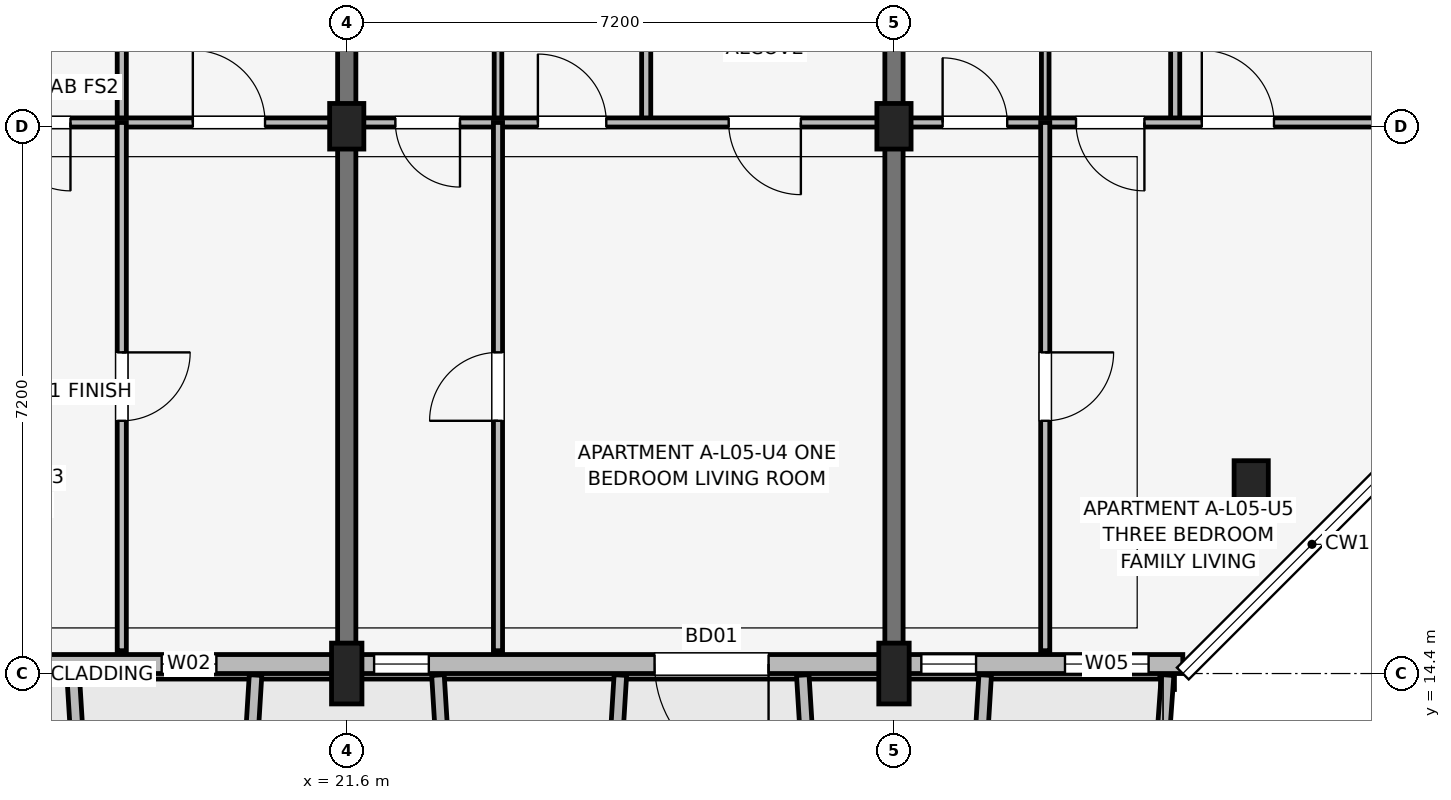
"""IFC4 building model, lengths in metres.
Left out: names, types, materials, properties, quantities, classifications, styles, units other than length and angle.
Written with IfcOpenShell. Run it as: python <this file> out.ifc"""

import sys

from ifc_helpers import new_model, si_unit, direction, frame, frame_2d, origin, origin_2d, place, context, subcontext, project, spatial, rectangle, extrude, element, fill, save


model = new_model("IFC4")
c1 = context("Model", 3, precision=1e-05, world=origin(), true_north=direction((0.0, 1.0)))
c2 = subcontext(c1, "Body", "Model", "MODEL_VIEW")
j1 = project(units=[si_unit("LENGTHUNIT", "METRE"), si_unit("PLANEANGLEUNIT", "RADIAN")], contexts=[c1])
p1 = place(None, origin())
s1 = spatial("IfcSite", under=j1, at=p1, CompositionType="ELEMENT")
p2 = place(p1, origin())
s2 = spatial("IfcBuilding", under=s1, at=p2, CompositionType="ELEMENT")
p3 = place(p2, frame((0.0, 0.0, 18.15)))
s3 = spatial("IfcBuildingStorey", under=s2, at=p3, CompositionType="ELEMENT", Elevation=18.15)
p4 = place(p3, frame((21.6, 14.4, 0.0), z_axis=(0.0, 0.0, 1.0), x_axis=(1.0, 0.0, 0.0)))
e1 = element("IfcColumn", 1, at=p4, inside=s3, PredefinedType="COLUMN", context=c2, shape_type="SweptSolid", body=[
    extrude(rectangle(XDim=0.4, YDim=0.8, at=origin_2d()), origin(), (0.0, 0.0, 1.0), 3.15),
])
p5 = place(p3, frame((21.6, 21.6, 0.0), z_axis=(0.0, 0.0, 1.0), x_axis=(1.0, 0.0, 0.0)))
e2 = element("IfcColumn", 2, at=p5, inside=s3, PredefinedType="COLUMN", context=c2, shape_type="SweptSolid", body=[
    extrude(rectangle(XDim=0.45, YDim=0.6, at=origin_2d()), origin(), (0.0, 0.0, 1.0), 3.15),
])
p6 = place(p3, frame((28.8, 14.4, 0.0), z_axis=(0.0, 0.0, 1.0), x_axis=(1.0, 0.0, 0.0)))
e3 = element("IfcColumn", 3, at=p6, inside=s3, PredefinedType="COLUMN", context=c2, shape_type="SweptSolid", body=[
    extrude(rectangle(XDim=0.4, YDim=0.8, at=origin_2d()), origin(), (0.0, 0.0, 1.0), 3.15),
])
for number, where, z_axis, x_axis in (
    (4, (28.8, 21.6, 0.0), (0.0, 0.0, 1.0), (1.0, 0.0, 0.0)),
    (5, (33.5, 16.9, 0.0), (0.0, 0.0, 1.0), (1.0, 0.0, 0.0)),
):
    element("IfcColumn", number, at=place(p3, frame(where, z_axis=z_axis, x_axis=x_axis)), inside=s3, PredefinedType="COLUMN", context=c2, shape_type="SweptSolid", body=[
        extrude(rectangle(XDim=0.45, YDim=0.6, at=origin_2d()), origin(), (0.0, 0.0, 1.0), 3.15),
    ])
for number, where, z_axis, x_axis in (
    (6, (21.6, 14.75, 0.0), (0.0, 0.0, 1.0), (0.0, 1.0, 0.0)),
    (7, (28.8, 14.75, 0.0), (0.0, 0.0, 1.0), (0.0, 1.0, 0.0)),
):
    element("IfcWall", number, at=place(p3, frame(where, z_axis=z_axis, x_axis=x_axis)), inside=s3, PredefinedType="SHEAR", context=c2, shape_type="SweptSolid", body=[
        extrude(rectangle(XDim=9.4, YDim=0.24, at=frame_2d((4.7, 0.0))), origin(), (0.0, 0.0, 1.0), 3.15),
    ])
p7 = place(p3, frame((3.4, 14.525, 0.0), z_axis=(0.0, 0.0, 1.0), x_axis=(1.0, 0.0, 0.0)))
e8 = element("IfcWall", 8, at=p7, inside=s3, PredefinedType="SOLIDWALL", context=c2, shape_type="SweptSolid", body=[
    extrude(rectangle(XDim=29.2, YDim=0.25, at=frame_2d((14.6, 0.0))), origin(), (0.0, 0.0, 1.0), 2.43),
])
p8 = place(p7, frame((9.425, 0.0, 0.0), z_axis=(0.0, 0.0, 1.0), x_axis=(-1.0, 0.0, 0.0)))
e9 = element("IfcOpeningElement", 9, at=p8, cuts=e8, PredefinedType="OPENING", context=c2, shape_type="SweptSolid", body=[
    extrude(rectangle(XDim=1.65, YDim=2.15, at=frame_2d((0.825, 1.075))), frame((0.0, 0.135, 0.0), z_axis=(0.0, -1.0, 0.0), x_axis=(1.0, 0.0, 0.0)), (0.0, 0.0, 1.0), 0.27),
])
p9 = place(p7, frame((23.75, 0.0, 0.0), z_axis=(0.0, 0.0, 1.0), x_axis=(-1.0, 0.0, 0.0)))
e10 = element("IfcOpeningElement", 10, at=p9, cuts=e8, PredefinedType="OPENING", context=c2, shape_type="SweptSolid", body=[
    extrude(rectangle(XDim=1.5, YDim=2.15, at=frame_2d((0.75, 1.075))), frame((0.0, 0.135, 0.0), z_axis=(0.0, -1.0, 0.0), x_axis=(1.0, 0.0, 0.0)), (0.0, 0.0, 1.0), 0.27),
])
p10 = place(p7, frame((0.61, 0.0, 0.7)))
e11 = element("IfcOpeningElement", 11, at=p10, cuts=e8, PredefinedType="OPENING", context=c2, shape_type="SweptSolid", body=[
    extrude(rectangle(XDim=1.58, YDim=1.6, at=frame_2d((0.79, 0.8))), frame((0.0, 0.135, 0.0), z_axis=(0.0, -1.0, 0.0), x_axis=(1.0, 0.0, 0.0)), (0.0, 0.0, 1.0), 0.27),
])
p11 = place(p7, frame((12.54, 0.0, 0.7)))
e12 = element("IfcOpeningElement", 12, at=p11, cuts=e8, PredefinedType="OPENING", context=c2, shape_type="SweptSolid", body=[
    extrude(rectangle(XDim=1.72, YDim=1.6, at=frame_2d((0.86, 0.8))), frame((0.0, 0.135, 0.0), z_axis=(0.0, -1.0, 0.0), x_axis=(1.0, 0.0, 0.0)), (0.0, 0.0, 1.0), 0.27),
])
p12 = place(p7, frame((15.765, 0.0, 0.75)))
e13 = element("IfcOpeningElement", 13, at=p12, cuts=e8, PredefinedType="OPENING", context=c2, shape_type="SweptSolid", body=[
    extrude(rectangle(XDim=0.72, YDim=1.35, at=frame_2d((0.36, 0.675))), frame((0.0, 0.135, 0.0), z_axis=(0.0, -1.0, 0.0), x_axis=(1.0, 0.0, 0.0)), (0.0, 0.0, 1.0), 0.27),
])
p13 = place(p7, frame((18.56, 0.0, 0.75)))
e14 = element("IfcOpeningElement", 14, at=p13, cuts=e8, PredefinedType="OPENING", context=c2, shape_type="SweptSolid", body=[
    extrude(rectangle(XDim=0.72, YDim=1.35, at=frame_2d((0.36, 0.675))), frame((0.0, 0.135, 0.0), z_axis=(0.0, -1.0, 0.0), x_axis=(1.0, 0.0, 0.0)), (0.0, 0.0, 1.0), 0.27),
])
p14 = place(p7, frame((25.76, 0.0, 0.75)))
e15 = element("IfcOpeningElement", 15, at=p14, cuts=e8, PredefinedType="OPENING", context=c2, shape_type="SweptSolid", body=[
    extrude(rectangle(XDim=0.72, YDim=1.35, at=frame_2d((0.36, 0.675))), frame((0.0, 0.135, 0.0), z_axis=(0.0, -1.0, 0.0), x_axis=(1.0, 0.0, 0.0)), (0.0, 0.0, 1.0), 0.27),
])
p15 = place(p7, frame((27.65, 0.0, 0.75)))
e16 = element("IfcOpeningElement", 16, at=p15, cuts=e8, PredefinedType="OPENING", context=c2, shape_type="SweptSolid", body=[
    extrude(rectangle(XDim=1.1, YDim=1.5, at=frame_2d((0.55, 0.75))), frame((0.0, 0.135, 0.0), z_axis=(0.0, -1.0, 0.0), x_axis=(1.0, 0.0, 0.0)), (0.0, 0.0, 1.0), 0.27),
])
for number, where, z_axis, x_axis in (
    (17, (18.0, 14.38, 0.0), (0.0, 0.0, 1.0), (0.061, -0.998, 0.0)),
    (18, (20.4, 14.38, 0.0), (0.0, 0.0, 1.0), (-0.061, -0.998, 0.0)),
):
    element("IfcWall", number, at=place(p3, frame(where, z_axis=z_axis, x_axis=x_axis)), inside=s3, PredefinedType="ELEMENTEDWALL", context=c2, shape_type="SweptSolid", body=[
        extrude(rectangle(XDim=1.964, YDim=0.165, at=frame_2d((0.982, 0.0))), origin(), (0.0, 0.0, 1.0), 2.48),
    ])
for number, where, z_axis, x_axis in (
    (19, (22.8, 14.38, 0.0), (0.0, 0.0, 1.0), (0.061, -0.998, 0.0)),
    (20, (25.2, 14.38, 0.0), (0.0, 0.0, 1.0), (-0.061, -0.998, 0.0)),
    (21, (27.6, 14.38, 0.0), (0.0, 0.0, 1.0), (0.061, -0.998, 0.0)),
):
    element("IfcWall", number, at=place(p3, frame(where, z_axis=z_axis, x_axis=x_axis)), inside=s3, PredefinedType="ELEMENTEDWALL", context=c2, shape_type="SweptSolid", body=[
        extrude(rectangle(XDim=1.964, YDim=0.165, at=frame_2d((0.982, 0.0))), origin(), (0.0, 0.0, 1.0), 2.53),
    ])
p16 = place(p3, frame((30.0, 14.38, 0.0), z_axis=(0.0, 0.0, 1.0), x_axis=(-0.061170732449, -0.998127317276, 0.0)))
e22 = element("IfcWall", 22, at=p16, inside=s3, PredefinedType="ELEMENTEDWALL", context=c2, shape_type="SweptSolid", body=[
    extrude(rectangle(XDim=1.964, YDim=0.165, at=frame_2d((0.982, 0.0))), origin(), (0.0, 0.0, 1.0), 2.95),
])
p17 = place(p3, frame((32.4, 14.38, 0.0), z_axis=(0.0, 0.0, 1.0), x_axis=(-0.071194071069, -0.997462482625, 0.0)))
e23 = element("IfcWall", 23, at=p17, inside=s3, PredefinedType="ELEMENTEDWALL", context=c2, shape_type="SweptSolid", body=[
    extrude(rectangle(XDim=1.965, YDim=0.165, at=frame_2d((0.982, 0.0))), origin(), (0.0, 0.0, 1.0), 2.95),
])
p18 = place(p3, frame((18.64, 21.65, 0.0), z_axis=(0.0, 0.0, 1.0), x_axis=(0.0, 1.0, 0.0)))
e24 = element("IfcWall", 24, at=p18, inside=s3, PredefinedType="PARTITIONING", context=c2, shape_type="SweptSolid", body=[
    extrude(rectangle(XDim=2.65, YDim=0.12, at=frame_2d((1.325, 0.0))), origin(), (0.0, 0.0, 1.0), 2.375),
])
p19 = place(p3, frame((14.54, 21.65, 0.0), z_axis=(0.0, 0.0, 1.0), x_axis=(1.0, 0.0, 0.0)))
e25 = element("IfcWall", 25, at=p19, inside=s3, PredefinedType="PARTITIONING", context=c2, shape_type="SweptSolid", body=[
    extrude(rectangle(XDim=6.92, YDim=0.12, at=frame_2d((3.46, 0.0))), origin(), (0.0, 0.0, 1.0), 2.375),
])
p20 = place(p19, frame((0.5, 0.0, 0.0)))
e26 = element("IfcOpeningElement", 26, at=p20, cuts=e25, PredefinedType="OPENING", context=c2, shape_type="SweptSolid", body=[
    extrude(rectangle(XDim=0.85, YDim=2.08, at=frame_2d((0.425, 1.04))), frame((0.0, 0.07, 0.0), z_axis=(0.0, -1.0, 0.0), x_axis=(1.0, 0.0, 0.0)), (0.0, 0.0, 1.0), 0.14),
])
p21 = place(p19, frame((3.425, 0.0, 0.0), z_axis=(0.0, 0.0, 1.0), x_axis=(-1.0, 0.0, 0.0)))
e27 = element("IfcOpeningElement", 27, at=p21, cuts=e25, PredefinedType="OPENING", context=c2, shape_type="SweptSolid", body=[
    extrude(rectangle(XDim=0.9, YDim=2.08, at=frame_2d((0.45, 1.04))), frame((0.0, 0.07, 0.0), z_axis=(0.0, -1.0, 0.0), x_axis=(1.0, 0.0, 0.0)), (0.0, 0.0, 1.0), 0.14),
])
p22 = place(p19, frame((5.035, 0.0, 0.0)))
e28 = element("IfcOpeningElement", 28, at=p22, cuts=e25, PredefinedType="OPENING", context=c2, shape_type="SweptSolid", body=[
    extrude(rectangle(XDim=0.95, YDim=2.08, at=frame_2d((0.475, 1.04))), frame((0.0, 0.07, 0.0), z_axis=(0.0, -1.0, 0.0), x_axis=(1.0, 0.0, 0.0)), (0.0, 0.0, 1.0), 0.14),
])
p23 = place(p3, frame((18.64, 14.7, 0.0), z_axis=(0.0, 0.0, 1.0), x_axis=(0.0, 1.0, 0.0)))
e29 = element("IfcWall", 29, at=p23, inside=s3, PredefinedType="PARTITIONING", context=c2, shape_type="SweptSolid", body=[
    extrude(rectangle(XDim=6.95, YDim=0.12, at=frame_2d((3.475, 0.0))), origin(), (0.0, 0.0, 1.0), 2.375),
])
p24 = place(p23, frame((3.925, 0.0, 0.0), z_axis=(0.0, 0.0, 1.0), x_axis=(-1.0, 0.0, 0.0)))
e30 = element("IfcOpeningElement", 30, at=p24, cuts=e29, PredefinedType="OPENING", context=c2, shape_type="SweptSolid", body=[
    extrude(rectangle(XDim=0.9, YDim=2.08, at=frame_2d((0.45, 1.04))), frame((0.0, 0.07, 0.0), z_axis=(0.0, -1.0, 0.0), x_axis=(1.0, 0.0, 0.0)), (0.0, 0.0, 1.0), 0.14),
])
p25 = place(p3, frame((23.59, 21.65, 0.0), z_axis=(0.0, 0.0, 1.0), x_axis=(0.0, 1.0, 0.0)))
e31 = element("IfcWall", 31, at=p25, inside=s3, PredefinedType="PARTITIONING", context=c2, shape_type="SweptSolid", body=[
    extrude(rectangle(XDim=2.65, YDim=0.1, at=frame_2d((1.325, 0.0))), origin(), (0.0, 0.0, 1.0), 2.375),
])
p26 = place(p3, frame((25.54, 21.65, 0.0), z_axis=(0.0, 0.0, 1.0), x_axis=(0.0, 1.0, 0.0)))
e32 = element("IfcWall", 32, at=p26, inside=s3, PredefinedType="PARTITIONING", context=c2, shape_type="SweptSolid", body=[
    extrude(rectangle(XDim=2.65, YDim=0.12, at=frame_2d((1.325, 0.0))), origin(), (0.0, 0.0, 1.0), 2.375),
])
p27 = place(p3, frame((21.74, 21.65, 0.0), z_axis=(0.0, 0.0, 1.0), x_axis=(1.0, 0.0, 0.0)))
e33 = element("IfcWall", 33, at=p27, inside=s3, PredefinedType="PARTITIONING", context=c2, shape_type="SweptSolid", body=[
    extrude(rectangle(XDim=6.92, YDim=0.12, at=frame_2d((3.46, 0.0))), origin(), (0.0, 0.0, 1.0), 2.375),
])
p28 = place(p27, frame((1.35, 0.0, 0.0), z_axis=(0.0, 0.0, 1.0), x_axis=(-1.0, 0.0, 0.0)))
e34 = element("IfcOpeningElement", 34, at=p28, cuts=e33, PredefinedType="OPENING", context=c2, shape_type="SweptSolid", body=[
    extrude(rectangle(XDim=0.85, YDim=2.08, at=frame_2d((0.425, 1.04))), frame((0.0, 0.07, 0.0), z_axis=(0.0, -1.0, 0.0), x_axis=(1.0, 0.0, 0.0)), (0.0, 0.0, 1.0), 0.14),
])
p29 = place(p27, frame((2.375, 0.0, 0.0)))
e35 = element("IfcOpeningElement", 35, at=p29, cuts=e33, PredefinedType="OPENING", context=c2, shape_type="SweptSolid", body=[
    extrude(rectangle(XDim=0.9, YDim=2.08, at=frame_2d((0.45, 1.04))), frame((0.0, 0.07, 0.0), z_axis=(0.0, -1.0, 0.0), x_axis=(1.0, 0.0, 0.0)), (0.0, 0.0, 1.0), 0.14),
])
p30 = place(p27, frame((5.835, 0.0, 0.0), z_axis=(0.0, 0.0, 1.0), x_axis=(-1.0, 0.0, 0.0)))
e36 = element("IfcOpeningElement", 36, at=p30, cuts=e33, PredefinedType="OPENING", context=c2, shape_type="SweptSolid", body=[
    extrude(rectangle(XDim=0.95, YDim=2.08, at=frame_2d((0.475, 1.04))), frame((0.0, 0.07, 0.0), z_axis=(0.0, -1.0, 0.0), x_axis=(1.0, 0.0, 0.0)), (0.0, 0.0, 1.0), 0.14),
])
p31 = place(p3, frame((23.59, 14.7, 0.0), z_axis=(0.0, 0.0, 1.0), x_axis=(0.0, 1.0, 0.0)))
e37 = element("IfcWall", 37, at=p31, inside=s3, PredefinedType="PARTITIONING", context=c2, shape_type="SweptSolid", body=[
    extrude(rectangle(XDim=6.95, YDim=0.12, at=frame_2d((3.475, 0.0))), origin(), (0.0, 0.0, 1.0), 2.375),
])
p32 = place(p31, frame((3.025, 0.0, 0.0)))
e38 = element("IfcOpeningElement", 38, at=p32, cuts=e37, PredefinedType="OPENING", context=c2, shape_type="SweptSolid", body=[
    extrude(rectangle(XDim=0.9, YDim=2.08, at=frame_2d((0.45, 1.04))), frame((0.0, 0.07, 0.0), z_axis=(0.0, -1.0, 0.0), x_axis=(1.0, 0.0, 0.0)), (0.0, 0.0, 1.0), 0.14),
])
p33 = place(p3, frame((30.79, 21.65, 0.0), z_axis=(0.0, 0.0, 1.0), x_axis=(0.0, 1.0, 0.0)))
e39 = element("IfcWall", 39, at=p33, inside=s3, PredefinedType="PARTITIONING", context=c2, shape_type="SweptSolid", body=[
    extrude(rectangle(XDim=2.65, YDim=0.1, at=frame_2d((1.325, 0.0))), origin(), (0.0, 0.0, 1.0), 2.375),
])
p34 = place(p3, frame((32.5, 21.65, 0.0), z_axis=(0.0, 0.0, 1.0), x_axis=(0.0, 1.0, 0.0)))
e40 = element("IfcWall", 40, at=p34, inside=s3, PredefinedType="PARTITIONING", context=c2, shape_type="SweptSolid", body=[
    extrude(rectangle(XDim=2.65, YDim=0.12, at=frame_2d((1.325, 0.0))), origin(), (0.0, 0.0, 1.0), 2.375),
])
p35 = place(p3, frame((28.94, 21.65, 0.0), z_axis=(0.0, 0.0, 1.0), x_axis=(1.0, 0.0, 0.0)))
e41 = element("IfcWall", 41, at=p35, inside=s3, PredefinedType="PARTITIONING", context=c2, shape_type="SweptSolid", body=[
    extrude(rectangle(XDim=6.92, YDim=0.12, at=frame_2d((3.46, 0.0))), origin(), (0.0, 0.0, 1.0), 2.375),
])
p36 = place(p35, frame((0.5, 0.0, 0.0)))
e42 = element("IfcOpeningElement", 42, at=p36, cuts=e41, PredefinedType="OPENING", context=c2, shape_type="SweptSolid", body=[
    extrude(rectangle(XDim=0.85, YDim=2.08, at=frame_2d((0.425, 1.04))), frame((0.0, 0.07, 0.0), z_axis=(0.0, -1.0, 0.0), x_axis=(1.0, 0.0, 0.0)), (0.0, 0.0, 1.0), 0.14),
])
p37 = place(p35, frame((3.155, 0.0, 0.0), z_axis=(0.0, 0.0, 1.0), x_axis=(-1.0, 0.0, 0.0)))
e43 = element("IfcOpeningElement", 43, at=p37, cuts=e41, PredefinedType="OPENING", context=c2, shape_type="SweptSolid", body=[
    extrude(rectangle(XDim=0.9, YDim=2.08, at=frame_2d((0.45, 1.04))), frame((0.0, 0.07, 0.0), z_axis=(0.0, -1.0, 0.0), x_axis=(1.0, 0.0, 0.0)), (0.0, 0.0, 1.0), 0.14),
])
p38 = place(p35, frame((3.91, 0.0, 0.0)))
e44 = element("IfcOpeningElement", 44, at=p38, cuts=e41, PredefinedType="OPENING", context=c2, shape_type="SweptSolid", body=[
    extrude(rectangle(XDim=0.95, YDim=2.08, at=frame_2d((0.475, 1.04))), frame((0.0, 0.07, 0.0), z_axis=(0.0, -1.0, 0.0), x_axis=(1.0, 0.0, 0.0)), (0.0, 0.0, 1.0), 0.14),
])
p39 = place(p3, frame((30.79, 14.7, 0.0), z_axis=(0.0, 0.0, 1.0), x_axis=(0.0, 1.0, 0.0)))
e45 = element("IfcWall", 45, at=p39, inside=s3, PredefinedType="PARTITIONING", context=c2, shape_type="SweptSolid", body=[
    extrude(rectangle(XDim=6.95, YDim=0.12, at=frame_2d((3.475, 0.0))), origin(), (0.0, 0.0, 1.0), 2.375),
])
p40 = place(p39, frame((3.925, 0.0, 0.0), z_axis=(0.0, 0.0, 1.0), x_axis=(-1.0, 0.0, 0.0)))
e46 = element("IfcOpeningElement", 46, at=p40, cuts=e45, PredefinedType="OPENING", context=c2, shape_type="SweptSolid", body=[
    extrude(rectangle(XDim=0.9, YDim=2.08, at=frame_2d((0.45, 1.04))), frame((0.0, 0.07, 0.0), z_axis=(0.0, -1.0, 0.0), x_axis=(1.0, 0.0, 0.0)), (0.0, 0.0, 1.0), 0.14),
])
p41 = place(p9, origin())
e47 = element("IfcDoor", 47, at=p41, inside=s3, OperationType="SINGLE_SWING_RIGHT", PredefinedType="DOOR", context=c2, shape_type="SweptSolid", body=[
    extrude(rectangle(XDim=1.5, YDim=2.15, at=frame_2d((0.75, 1.075))), frame((0.0, 0.025, 0.0), z_axis=(0.0, -1.0, 0.0), x_axis=(1.0, 0.0, 0.0)), (0.0, 0.0, 1.0), 0.05),
])
fill(e10, e47)
p42 = place(p12, origin())
e48 = element("IfcWindow", 48, at=p42, inside=s3, PartitioningType="SINGLE_PANEL", PredefinedType="WINDOW", context=c2, shape_type="SweptSolid", body=[
    extrude(rectangle(XDim=0.72, YDim=1.35, at=frame_2d((0.36, 0.675))), frame((0.0, 0.03, 0.0), z_axis=(0.0, -1.0, 0.0), x_axis=(1.0, 0.0, 0.0)), (0.0, 0.0, 1.0), 0.06),
])
fill(e13, e48)
p43 = place(p13, origin())
e49 = element("IfcWindow", 49, at=p43, inside=s3, PartitioningType="SINGLE_PANEL", PredefinedType="WINDOW", context=c2, shape_type="SweptSolid", body=[
    extrude(rectangle(XDim=0.72, YDim=1.35, at=frame_2d((0.36, 0.675))), frame((0.0, 0.03, 0.0), z_axis=(0.0, -1.0, 0.0), x_axis=(1.0, 0.0, 0.0)), (0.0, 0.0, 1.0), 0.06),
])
fill(e14, e49)
p44 = place(p14, origin())
e50 = element("IfcWindow", 50, at=p44, inside=s3, PartitioningType="SINGLE_PANEL", PredefinedType="WINDOW", context=c2, shape_type="SweptSolid", body=[
    extrude(rectangle(XDim=0.72, YDim=1.35, at=frame_2d((0.36, 0.675))), frame((0.0, 0.03, 0.0), z_axis=(0.0, -1.0, 0.0), x_axis=(1.0, 0.0, 0.0)), (0.0, 0.0, 1.0), 0.06),
])
fill(e15, e50)
p45 = place(p15, origin())
e51 = element("IfcWindow", 51, at=p45, inside=s3, PartitioningType="SINGLE_PANEL", PredefinedType="WINDOW", context=c2, shape_type="SweptSolid", body=[
    extrude(rectangle(XDim=1.1, YDim=1.5, at=frame_2d((0.55, 0.75))), frame((0.0, 0.03, 0.0), z_axis=(0.0, -1.0, 0.0), x_axis=(1.0, 0.0, 0.0)), (0.0, 0.0, 1.0), 0.06),
])
fill(e16, e51)
p46 = place(p21, origin())
e52 = element("IfcDoor", 52, at=p46, inside=s3, OperationType="SINGLE_SWING_RIGHT", PredefinedType="DOOR", context=c2, shape_type="SweptSolid", body=[
    extrude(rectangle(XDim=0.9, YDim=2.08, at=frame_2d((0.45, 1.04))), frame((0.0, 0.025, 0.0), z_axis=(0.0, -1.0, 0.0), x_axis=(1.0, 0.0, 0.0)), (0.0, 0.0, 1.0), 0.05),
])
fill(e27, e52)
p47 = place(p22, origin())
e53 = element("IfcDoor", 53, at=p47, inside=s3, OperationType="SINGLE_SWING_LEFT", PredefinedType="DOOR", context=c2, shape_type="SweptSolid", body=[
    extrude(rectangle(XDim=0.95, YDim=2.08, at=frame_2d((0.475, 1.04))), frame((0.0, 0.025, 0.0), z_axis=(0.0, -1.0, 0.0), x_axis=(1.0, 0.0, 0.0)), (0.0, 0.0, 1.0), 0.05),
])
fill(e28, e53)
p48 = place(p24, origin())
e54 = element("IfcDoor", 54, at=p48, inside=s3, OperationType="SINGLE_SWING_RIGHT", PredefinedType="DOOR", context=c2, shape_type="SweptSolid", body=[
    extrude(rectangle(XDim=0.9, YDim=2.08, at=frame_2d((0.45, 1.04))), frame((0.0, 0.025, 0.0), z_axis=(0.0, -1.0, 0.0), x_axis=(1.0, 0.0, 0.0)), (0.0, 0.0, 1.0), 0.05),
])
fill(e30, e54)
p49 = place(p28, origin())
e55 = element("IfcDoor", 55, at=p49, inside=s3, OperationType="SINGLE_SWING_RIGHT", PredefinedType="DOOR", context=c2, shape_type="SweptSolid", body=[
    extrude(rectangle(XDim=0.85, YDim=2.08, at=frame_2d((0.425, 1.04))), frame((0.0, 0.025, 0.0), z_axis=(0.0, -1.0, 0.0), x_axis=(1.0, 0.0, 0.0)), (0.0, 0.0, 1.0), 0.05),
])
fill(e34, e55)
p50 = place(p29, origin())
e56 = element("IfcDoor", 56, at=p50, inside=s3, OperationType="SINGLE_SWING_LEFT", PredefinedType="DOOR", context=c2, shape_type="SweptSolid", body=[
    extrude(rectangle(XDim=0.9, YDim=2.08, at=frame_2d((0.45, 1.04))), frame((0.0, 0.025, 0.0), z_axis=(0.0, -1.0, 0.0), x_axis=(1.0, 0.0, 0.0)), (0.0, 0.0, 1.0), 0.05),
])
fill(e35, e56)
p51 = place(p30, origin())
e57 = element("IfcDoor", 57, at=p51, inside=s3, OperationType="SINGLE_SWING_RIGHT", PredefinedType="DOOR", context=c2, shape_type="SweptSolid", body=[
    extrude(rectangle(XDim=0.95, YDim=2.08, at=frame_2d((0.475, 1.04))), frame((0.0, 0.025, 0.0), z_axis=(0.0, -1.0, 0.0), x_axis=(1.0, 0.0, 0.0)), (0.0, 0.0, 1.0), 0.05),
])
fill(e36, e57)
p52 = place(p32, origin())
e58 = element("IfcDoor", 58, at=p52, inside=s3, OperationType="SINGLE_SWING_LEFT", PredefinedType="DOOR", context=c2, shape_type="SweptSolid", body=[
    extrude(rectangle(XDim=0.9, YDim=2.08, at=frame_2d((0.45, 1.04))), frame((0.0, 0.025, 0.0), z_axis=(0.0, -1.0, 0.0), x_axis=(1.0, 0.0, 0.0)), (0.0, 0.0, 1.0), 0.05),
])
fill(e38, e58)
p53 = place(p36, origin())
e59 = element("IfcDoor", 59, at=p53, inside=s3, OperationType="SINGLE_SWING_LEFT", PredefinedType="DOOR", context=c2, shape_type="SweptSolid", body=[
    extrude(rectangle(XDim=0.85, YDim=2.08, at=frame_2d((0.425, 1.04))), frame((0.0, 0.025, 0.0), z_axis=(0.0, -1.0, 0.0), x_axis=(1.0, 0.0, 0.0)), (0.0, 0.0, 1.0), 0.05),
])
fill(e42, e59)
p54 = place(p37, origin())
e60 = element("IfcDoor", 60, at=p54, inside=s3, OperationType="SINGLE_SWING_RIGHT", PredefinedType="DOOR", context=c2, shape_type="SweptSolid", body=[
    extrude(rectangle(XDim=0.9, YDim=2.08, at=frame_2d((0.45, 1.04))), frame((0.0, 0.025, 0.0), z_axis=(0.0, -1.0, 0.0), x_axis=(1.0, 0.0, 0.0)), (0.0, 0.0, 1.0), 0.05),
])
fill(e43, e60)
p55 = place(p38, origin())
e61 = element("IfcDoor", 61, at=p55, inside=s3, OperationType="SINGLE_SWING_LEFT", PredefinedType="DOOR", context=c2, shape_type="SweptSolid", body=[
    extrude(rectangle(XDim=0.95, YDim=2.08, at=frame_2d((0.475, 1.04))), frame((0.0, 0.025, 0.0), z_axis=(0.0, -1.0, 0.0), x_axis=(1.0, 0.0, 0.0)), (0.0, 0.0, 1.0), 0.05),
])
fill(e44, e61)
p56 = place(p40, origin())
e62 = element("IfcDoor", 62, at=p56, inside=s3, OperationType="SINGLE_SWING_RIGHT", PredefinedType="DOOR", context=c2, shape_type="SweptSolid", body=[
    extrude(rectangle(XDim=0.9, YDim=2.08, at=frame_2d((0.45, 1.04))), frame((0.0, 0.025, 0.0), z_axis=(0.0, -1.0, 0.0), x_axis=(1.0, 0.0, 0.0)), (0.0, 0.0, 1.0), 0.05),
])
fill(e46, e62)
save(model, sys.argv[1])
